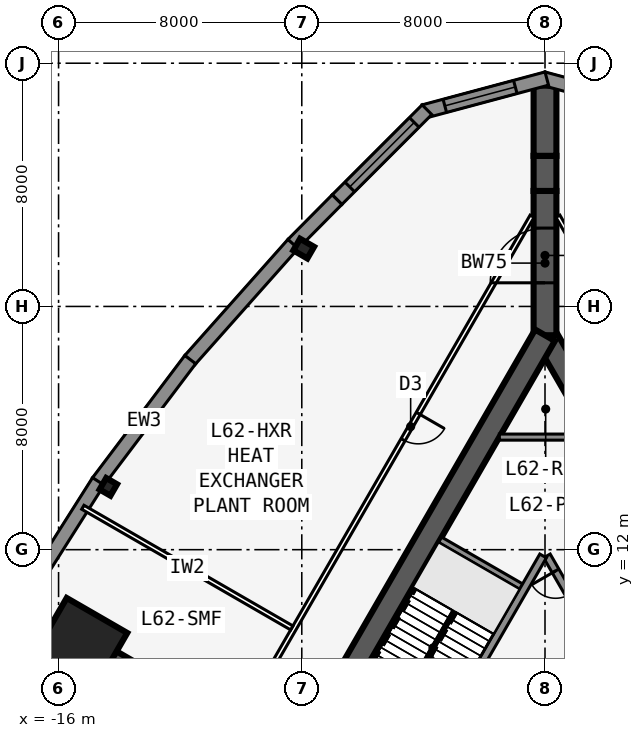
"""IFC4 building model, lengths in metres.
Left out: names, types, materials, properties, quantities, classifications, styles, units other than length and angle.
Written with IfcOpenShell. Run it as: python <this file> out.ifc"""

import sys

from ifc_helpers import new_model, si_unit, direction, frame, frame_2d, origin, origin_2d, place, context, subcontext, project, spatial, polyline, rectangle, i_section, outline, extrude, element, fill, save


model = new_model("IFC4")
c1 = context("Model", 3, precision=1e-05, world=origin(), true_north=direction((0.0, 1.0)))
c2 = subcontext(c1, "Body", "Model", "MODEL_VIEW")
j1 = project(units=[si_unit("LENGTHUNIT", "METRE"), si_unit("PLANEANGLEUNIT", "RADIAN")], contexts=[c1])
p1 = place(None, origin())
s1 = spatial("IfcSite", under=j1, at=p1, CompositionType="ELEMENT")
p2 = place(p1, origin())
s2 = spatial("IfcBuilding", under=s1, at=p2, CompositionType="ELEMENT")
p3 = place(p2, frame((0.0, 0.0, 233.3)))
s3 = spatial("IfcBuildingStorey", under=s2, at=p3, CompositionType="ELEMENT", Elevation=233.3)
p4 = place(p3, frame((8.25, 4.763, 0.0), z_axis=(0.0, 0.0, 1.0), x_axis=(-0.500002952946, 0.866023698893, 0.0)))
e1 = element("IfcWall", 1, at=p4, inside=s3, PredefinedType="SHEAR", context=c2, shape_type="SweptSolid", body=[
    extrude(rectangle(XDim=16.5, YDim=0.75, at=frame_2d((8.25, 0.0))), origin(), (0.0, 0.0, 1.0), 6.0),
])
p5 = place(p3, frame((5.379, 2.586, 0.0), z_axis=(0.0, 0.0, 1.0), x_axis=(-0.500001375892, 0.866024609411, 0.0)))
e2 = element("IfcWall", 2, at=p5, inside=s3, PredefinedType="SOLIDWALL", context=c2, shape_type="SweptSolid", body=[
    extrude(rectangle(XDim=10.633, YDim=0.25, at=frame_2d((5.316, 0.0))), origin(), (0.0, 0.0, 1.0), 5.75),
])
p6 = place(p5, frame((9.164, 0.0, 0.0)))
e3 = element("IfcOpeningElement", 3, at=p6, cuts=e2, PredefinedType="OPENING", context=c2, shape_type="SweptSolid", body=[
    extrude(rectangle(XDim=0.9, YDim=2.13, at=frame_2d((0.45, 1.065))), frame((0.0, 0.135, 0.0), z_axis=(0.0, -1.0, 0.0), x_axis=(1.0, 0.0, 0.0)), (0.0, 0.0, 1.0), 0.27),
])
p7 = place(p5, frame((1.0, 0.0, 0.0)))
e4 = element("IfcOpeningElement", 4, at=p7, cuts=e2, PredefinedType="OPENING", context=c2, shape_type="SweptSolid", body=[
    extrude(rectangle(XDim=1.1, YDim=2.13, at=frame_2d((0.55, 1.065))), frame((0.0, 0.135, 0.0), z_axis=(0.0, -1.0, 0.0), x_axis=(1.0, 0.0, 0.0)), (0.0, 0.0, 1.0), 0.27),
])
p8 = place(p5, frame((3.9, 0.0, 0.0)))
e5 = element("IfcOpeningElement", 5, at=p8, cuts=e2, PredefinedType="OPENING", context=c2, shape_type="SweptSolid", body=[
    extrude(rectangle(XDim=1.1, YDim=2.13, at=frame_2d((0.55, 1.065))), frame((0.0, 0.135, 0.0), z_axis=(0.0, -1.0, 0.0), x_axis=(1.0, 0.0, 0.0)), (0.0, 0.0, 1.0), 0.27),
])
p9 = place(p5, frame((6.8, 0.0, 0.0)))
e6 = element("IfcOpeningElement", 6, at=p9, cuts=e2, PredefinedType="OPENING", context=c2, shape_type="SweptSolid", body=[
    extrude(rectangle(XDim=1.1, YDim=2.13, at=frame_2d((0.55, 1.065))), frame((0.0, 0.135, 0.0), z_axis=(0.0, -1.0, 0.0), x_axis=(1.0, 0.0, 0.0)), (0.0, 0.0, 1.0), 0.27),
])
p10 = place(p3, frame((0.0, 19.052, 0.0), z_axis=(0.0, 0.0, 1.0), x_axis=(-0.500002952946, -0.866023698893, 0.0)))
e7 = element("IfcWall", 7, at=p10, inside=s3, PredefinedType="SHEAR", context=c2, shape_type="SweptSolid", body=[
    extrude(rectangle(XDim=16.5, YDim=0.75, at=frame_2d((8.25, 0.0))), origin(), (0.0, 0.0, 1.0), 6.0),
])
p11 = place(p10, frame((14.15, 0.0, 0.0)))
e8 = element("IfcOpeningElement", 8, at=p11, cuts=e7, PredefinedType="OPENING", context=c2, shape_type="SweptSolid", body=[
    extrude(rectangle(XDim=1.8, YDim=2.13, at=frame_2d((0.9, 1.065))), frame((0.0, 0.385, 0.0), z_axis=(0.0, -1.0, 0.0), x_axis=(1.0, 0.0, 0.0)), (0.0, 0.0, 1.0), 0.77),
])
p12 = place(p10, frame((12.6, 0.0, 0.0)))
e9 = element("IfcOpeningElement", 9, at=p12, cuts=e7, PredefinedType="OPENING", context=c2, shape_type="SweptSolid", body=[
    extrude(rectangle(XDim=1.0, YDim=2.13, at=frame_2d((0.5, 1.065))), frame((0.0, 0.385, 0.0), z_axis=(0.0, -1.0, 0.0), x_axis=(1.0, 0.0, 0.0)), (0.0, 0.0, 1.0), 0.77),
])
p13 = place(p3, frame((-0.062, 11.794, 0.0), z_axis=(0.0, 0.0, 1.0), x_axis=(-0.500006680225, -0.86602154692, 0.0)))
e10 = element("IfcWall", 10, at=p13, inside=s3, PredefinedType="SOLIDWALL", context=c2, shape_type="SweptSolid", body=[
    extrude(rectangle(XDim=7.733, YDim=0.25, at=frame_2d((3.866, 0.0))), origin(), (0.0, 0.0, 1.0), 5.75),
])
p14 = place(p3, frame((-0.679, 10.727, 0.0), z_axis=(0.0, 0.0, 1.0), x_axis=(-0.866008981251, 0.500028443584, 0.0)))
e11 = element("IfcWall", 11, at=p14, inside=s3, PredefinedType="SOLIDWALL", context=c2, shape_type="SweptSolid", body=[
    extrude(rectangle(XDim=3.2, YDim=0.2, at=frame_2d((1.6, 0.0))), origin(), (0.0, 0.0, 1.0), 5.75),
])
p15 = place(p3, frame((0.0, 19.052, 0.0), z_axis=(0.0, 0.0, 1.0), x_axis=(0.0, 1.0, 0.0)))
e12 = element("IfcWall", 12, at=p15, inside=s3, PredefinedType="SHEAR", context=c2, shape_type="SweptSolid", body=[
    extrude(rectangle(XDim=4.746, YDim=0.75, at=frame_2d((2.373, 0.0))), origin(), (0.0, 0.0, 1.0), 6.0),
])
p16 = place(p15, frame((1.725, 0.0, 0.0)))
e13 = element("IfcOpeningElement", 13, at=p16, cuts=e12, PredefinedType="OPENING", context=c2, shape_type="SweptSolid", body=[
    extrude(rectangle(XDim=1.8, YDim=2.13, at=frame_2d((0.9, 1.065))), frame((0.0, 0.385, 0.0), z_axis=(0.0, -1.0, 0.0), x_axis=(1.0, 0.0, 0.0)), (0.0, 0.0, 1.0), 0.77),
])
p17 = place(p3, frame((0.0, 23.799, 0.0), z_axis=(0.0, 0.0, 1.0), x_axis=(0.0, 1.0, 0.0)))
e14 = element("IfcWall", 14, at=p17, inside=s3, PredefinedType="SHEAR", context=c2, shape_type="SweptSolid", body=[
    extrude(rectangle(XDim=1.155, YDim=0.75, at=frame_2d((0.577, 0.0))), origin(), (0.0, 0.0, 1.0), 6.0),
])
p18 = place(p3, frame((0.0, 24.953, 0.0), z_axis=(0.0, 0.0, 1.0), x_axis=(0.0, 1.0, 0.0)))
e15 = element("IfcWall", 15, at=p18, inside=s3, PredefinedType="SHEAR", context=c2, shape_type="SweptSolid", body=[
    extrude(rectangle(XDim=2.309, YDim=0.75, at=frame_2d((1.155, 0.0))), origin(), (0.0, 0.0, 1.0), 6.0),
])
p19 = place(p3, frame((-8.25, 4.763, 0.0), z_axis=(0.0, 0.0, 1.0), x_axis=(-0.866023543838, 0.500003221507, 0.0)))
e16 = element("IfcWall", 16, at=p19, inside=s3, PredefinedType="SHEAR", context=c2, shape_type="SweptSolid", body=[
    extrude(rectangle(XDim=8.154, YDim=0.9, at=frame_2d((4.077, 0.0))), origin(), (0.0, 0.0, 1.0), 6.0),
])
p20 = place(p3, frame((-7.937, 21.903, 0.0), z_axis=(0.0, 0.0, 1.0), x_axis=(-0.5, -0.866025403784, 0.0)))
e17 = element("IfcColumn", 17, at=p20, inside=s3, PredefinedType="COLUMN", context=c2, shape_type="SweptSolid", body=[
    extrude(i_section(OverallWidth=0.442, OverallDepth=0.531, WebThickness=0.066, FlangeThickness=0.106, at=origin_2d()), origin(), (0.0, 0.0, 1.0), 6.0),
])
p21 = place(p3, frame((-14.363, 14.066, 0.0), z_axis=(0.0, 0.0, 1.0), x_axis=(-0.866025403784, 0.5, 0.0)))
e18 = element("IfcColumn", 18, at=p21, inside=s3, PredefinedType="COLUMN", context=c2, shape_type="SweptSolid", body=[
    extrude(i_section(OverallWidth=0.411, OverallDepth=0.434, WebThickness=0.036, FlangeThickness=0.057, at=origin_2d()), origin(), (0.0, 0.0, 1.0), 6.0),
])
p22 = place(p3, frame((-15.312, 8.84, 0.0), z_axis=(0.0, 0.0, 1.0), x_axis=(-0.866025403784, 0.5, 0.0)))
e19 = element("IfcColumn", 19, at=p22, inside=s3, PredefinedType="COLUMN", context=c2, shape_type="SweptSolid", body=[
    extrude(rectangle(XDim=2.3, YDim=2.3, at=origin_2d()), origin(), (0.0, 0.0, 1.0), 6.0),
])
p23 = place(p3, frame((3.983, 26.413, 0.0), z_axis=(0.0, 0.0, 1.0), x_axis=(-0.965920442324, 0.258839137498, 0.0)))
e20 = element("IfcWall", 20, at=p23, inside=s3, PredefinedType="SOLIDWALL", context=c2, shape_type="SweptSolid", body=[
    extrude(outline(polyline([(4.184, 0.225), (4.124, 0.225), (3.706, 0.113), (3.676, 0.225), (0.0, 0.225), (0.0, -0.225), (4.184, -0.225), (4.184, 0.225)])), origin(), (0.0, 0.0, 1.0), 5.75),
])
p24 = place(p23, frame((0.713, 0.0, 0.9)))
e21 = element("IfcOpeningElement", 21, at=p24, cuts=e20, PredefinedType="OPENING", context=c2, shape_type="SweptSolid", body=[
    extrude(rectangle(XDim=2.4, YDim=3.6, at=frame_2d((1.2, 1.8))), frame((0.0, 0.235, 0.0), z_axis=(0.0, -1.0, 0.0), x_axis=(1.0, 0.0, 0.0)), (0.0, 0.0, 1.0), 0.47),
])
p25 = place(p3, frame((0.058, 27.496, 0.0), z_axis=(0.0, 0.0, 1.0), x_axis=(-0.965920442324, -0.258839137498, 0.0)))
e22 = element("IfcWall", 22, at=p25, inside=s3, PredefinedType="SOLIDWALL", context=c2, shape_type="SweptSolid", body=[
    extrude(outline(polyline([(4.184, 0.225), (0.509, 0.225), (0.479, 0.113), (0.06, 0.225), (0.0, 0.225), (0.0, -0.225), (4.184, -0.225), (4.184, 0.225)])), origin(), (0.0, 0.0, 1.0), 5.75),
])
p26 = place(p25, frame((1.071, 0.0, 0.9)))
e23 = element("IfcOpeningElement", 23, at=p26, cuts=e22, PredefinedType="OPENING", context=c2, shape_type="SweptSolid", body=[
    extrude(rectangle(XDim=2.4, YDim=3.6, at=frame_2d((1.2, 1.8))), frame((0.0, 0.235, 0.0), z_axis=(0.0, -1.0, 0.0), x_axis=(1.0, 0.0, 0.0)), (0.0, 0.0, 1.0), 0.47),
])
p27 = place(p3, frame((-3.882, 26.471, 0.0), z_axis=(0.0, 0.0, 1.0), x_axis=(-0.707106781187, -0.707106781187, 0.0)))
e24 = element("IfcWall", 24, at=p27, inside=s3, PredefinedType="SOLIDWALL", context=c2, shape_type="SweptSolid", body=[
    extrude(rectangle(XDim=4.184, YDim=0.45, at=frame_2d((2.092, 0.0))), origin(), (0.0, 0.0, 1.0), 5.75),
])
p28 = place(p27, frame((0.592, 0.0, 0.9)))
e25 = element("IfcOpeningElement", 25, at=p28, cuts=e24, PredefinedType="OPENING", context=c2, shape_type="SweptSolid", body=[
    extrude(rectangle(XDim=3.0, YDim=3.6, at=frame_2d((1.5, 1.8))), frame((0.0, 0.235, 0.0), z_axis=(0.0, -1.0, 0.0), x_axis=(1.0, 0.0, 0.0)), (0.0, 0.0, 1.0), 0.47),
])
p29 = place(p3, frame((-6.84, 23.513, 0.0), z_axis=(0.0, 0.0, 1.0), x_axis=(-0.704208960141, -0.709992774933, 0.0)))
e26 = element("IfcWall", 26, at=p29, inside=s3, PredefinedType="SOLIDWALL", context=c2, shape_type="SweptSolid", body=[
    extrude(rectangle(XDim=2.068, YDim=0.45, at=frame_2d((1.034, 0.0))), origin(), (0.0, 0.0, 1.0), 5.75),
])
p30 = place(p3, frame((-8.288, 22.053, 0.0), z_axis=(0.0, 0.0, 1.0), x_axis=(-0.664375712375, -0.747398764253, 0.0)))
e27 = element("IfcWall", 27, at=p30, inside=s3, PredefinedType="SOLIDWALL", context=c2, shape_type="SweptSolid", body=[
    extrude(outline(polyline([(0.0, 0.0), (5.105, 0.0), (5.105, 5.75), (0.0, 5.75), (0.0, 0.0)]), holes=[polyline([(4.502, 2.875), (4.436, 3.38), (4.241, 3.85), (3.931, 4.254), (3.527, 4.564), (3.057, 4.759), (2.552, 4.825), (2.048, 4.759), (1.577, 4.564), (1.174, 4.254), (0.864, 3.85), (0.669, 3.38), (0.602, 2.875), (0.669, 2.37), (0.864, 1.9), (1.174, 1.496), (1.577, 1.186), (2.048, 0.991), (2.552, 0.925), (3.057, 0.991), (3.527, 1.186), (3.931, 1.496), (4.241, 1.9), (4.436, 2.37), (4.502, 2.875)])]), frame((0.0, 0.225, 0.0), z_axis=(0.0, -1.0, 0.0), x_axis=(1.0, 0.0, 0.0)), (0.0, 0.0, 1.0), 0.45),
])
p31 = place(p3, frame((-11.668, 18.252, 0.0), z_axis=(0.0, 0.0, 1.0), x_axis=(-0.602408653511, -0.798187831388, 0.0)))
e28 = element("IfcWall", 28, at=p31, inside=s3, PredefinedType="SOLIDWALL", context=c2, shape_type="SweptSolid", body=[
    extrude(outline(polyline([(0.0, 0.0), (5.038, 0.0), (5.038, 5.75), (0.0, 5.75), (0.0, 0.0)]), holes=[polyline([(4.419, 2.875), (4.354, 3.367), (4.164, 3.825), (3.863, 4.219), (3.469, 4.52), (3.011, 4.71), (2.519, 4.775), (2.027, 4.71), (1.569, 4.52), (1.176, 4.219), (0.874, 3.825), (0.684, 3.367), (0.619, 2.875), (0.684, 2.383), (0.874, 1.925), (1.176, 1.531), (1.569, 1.229), (2.027, 1.04), (2.519, 0.975), (3.011, 1.04), (3.469, 1.229), (3.863, 1.531), (4.164, 1.925), (4.354, 2.383), (4.419, 2.875)])]), frame((0.0, 0.225, 0.0), z_axis=(0.0, -1.0, 0.0), x_axis=(1.0, 0.0, 0.0)), (0.0, 0.0, 1.0), 0.45),
])
p32 = place(p3, frame((-14.693, 14.246, 0.0), z_axis=(0.0, 0.0, 1.0), x_axis=(-0.535242418236, -0.844698498709, 0.0)))
e29 = element("IfcWall", 29, at=p32, inside=s3, PredefinedType="SOLIDWALL", context=c2, shape_type="SweptSolid", body=[
    extrude(outline(polyline([(0.0, 0.0), (5.004, 0.0), (5.004, 5.75), (0.0, 5.75), (0.0, 0.0)]), holes=[polyline([(4.402, 2.875), (4.337, 3.367), (4.148, 3.825), (3.846, 4.219), (3.452, 4.52), (2.994, 4.71), (2.502, 4.775), (2.01, 4.71), (1.552, 4.52), (1.159, 4.219), (0.857, 3.825), (0.667, 3.367), (0.602, 2.875), (0.667, 2.383), (0.857, 1.925), (1.159, 1.531), (1.552, 1.229), (2.01, 1.04), (2.502, 0.975), (2.994, 1.04), (3.452, 1.229), (3.846, 1.531), (4.148, 1.925), (4.337, 2.383), (4.402, 2.875)])]), frame((0.0, 0.225, 0.0), z_axis=(0.0, -1.0, 0.0), x_axis=(1.0, 0.0, 0.0)), (0.0, 0.0, 1.0), 0.45),
])
p33 = place(p3, frame((20.102, -11.115, 0.0), z_axis=(0.0, 0.0, 1.0), x_axis=(-0.500000265775, 0.866025250339, 0.0)))
e30 = element("IfcWall", 30, at=p33, inside=s3, PredefinedType="PARTITIONING", context=c2, shape_type="SweptSolid", body=[
    extrude(rectangle(XDim=39.354, YDim=0.15, at=frame_2d((19.677, 0.0))), origin(), (0.0, 0.0, 1.0), 5.75),
])
p34 = place(p33, frame((9.489, 0.0, 0.0)))
e31 = element("IfcOpeningElement", 31, at=p34, cuts=e30, PredefinedType="OPENING", context=c2, shape_type="SweptSolid", body=[
    extrude(rectangle(XDim=1.0, YDim=2.13, at=frame_2d((0.5, 1.065))), frame((0.0, 0.085, 0.0), z_axis=(0.0, -1.0, 0.0), x_axis=(1.0, 0.0, 0.0)), (0.0, 0.0, 1.0), 0.17),
])
p35 = place(p33, frame((21.177, 0.0, 0.0)))
e32 = element("IfcOpeningElement", 32, at=p35, cuts=e30, PredefinedType="OPENING", context=c2, shape_type="SweptSolid", body=[
    extrude(rectangle(XDim=1.0, YDim=2.13, at=frame_2d((0.5, 1.065))), frame((0.0, 0.085, 0.0), z_axis=(0.0, -1.0, 0.0), x_axis=(1.0, 0.0, 0.0)), (0.0, 0.0, 1.0), 0.17),
])
p36 = place(p33, frame((30.865, 0.0, 0.0)))
e33 = element("IfcOpeningElement", 33, at=p36, cuts=e30, PredefinedType="OPENING", context=c2, shape_type="SweptSolid", body=[
    extrude(rectangle(XDim=1.0, YDim=2.13, at=frame_2d((0.5, 1.065))), frame((0.0, 0.085, 0.0), z_axis=(0.0, -1.0, 0.0), x_axis=(1.0, 0.0, 0.0)), (0.0, 0.0, 1.0), 0.17),
])
p37 = place(p3, frame((-0.425, 22.966, 0.0), z_axis=(0.0, 0.0, 1.0), x_axis=(-0.500000265775, -0.866025250339, 0.0)))
e34 = element("IfcWall", 34, at=p37, inside=s3, PredefinedType="PARTITIONING", context=c2, shape_type="SweptSolid", body=[
    extrude(rectangle(XDim=39.354, YDim=0.15, at=frame_2d((19.677, 0.0))), origin(), (0.0, 0.0, 1.0), 5.75),
])
p38 = place(p37, frame((7.489, 0.0, 0.0)))
e35 = element("IfcOpeningElement", 35, at=p38, cuts=e34, PredefinedType="OPENING", context=c2, shape_type="SweptSolid", body=[
    extrude(rectangle(XDim=1.0, YDim=2.13, at=frame_2d((0.5, 1.065))), frame((0.0, 0.085, 0.0), z_axis=(0.0, -1.0, 0.0), x_axis=(1.0, 0.0, 0.0)), (0.0, 0.0, 1.0), 0.17),
])
p39 = place(p37, frame((17.177, 0.0, 0.0)))
e36 = element("IfcOpeningElement", 36, at=p39, cuts=e34, PredefinedType="OPENING", context=c2, shape_type="SweptSolid", body=[
    extrude(rectangle(XDim=1.0, YDim=2.13, at=frame_2d((0.5, 1.065))), frame((0.0, 0.085, 0.0), z_axis=(0.0, -1.0, 0.0), x_axis=(1.0, 0.0, 0.0)), (0.0, 0.0, 1.0), 0.17),
])
p40 = place(p37, frame((28.865, 0.0, 0.0)))
e37 = element("IfcOpeningElement", 37, at=p40, cuts=e34, PredefinedType="OPENING", context=c2, shape_type="SweptSolid", body=[
    extrude(rectangle(XDim=1.0, YDim=2.13, at=frame_2d((0.5, 1.065))), frame((0.0, 0.085, 0.0), z_axis=(0.0, -1.0, 0.0), x_axis=(1.0, 0.0, 0.0)), (0.0, 0.0, 1.0), 0.17),
])
p41 = place(p3, frame((-8.329, 9.427, 0.0), z_axis=(0.0, 0.0, 1.0), x_axis=(-0.866027296944, 0.499996720937, 0.0)))
e38 = element("IfcWall", 38, at=p41, inside=s3, PredefinedType="PARTITIONING", context=c2, shape_type="SweptSolid", body=[
    extrude(rectangle(XDim=7.937, YDim=0.15, at=frame_2d((3.968, 0.0))), origin(), (0.0, 0.0, 1.0), 5.75),
])
p42 = place(p3, frame((-1.501, 15.703, 0.0), z_axis=(0.0, 0.0, 1.0), x_axis=(1.0, 0.0, 0.0)))
e39 = element("IfcWall", 39, at=p42, inside=s3, PredefinedType="SOLIDWALL", context=c2, shape_type="SweptSolid", body=[
    extrude(rectangle(XDim=3.002, YDim=0.2, at=frame_2d((1.501, 0.0))), origin(), (0.0, 0.0, 1.0), 5.75),
])
p43 = place(p3, frame((-2.988, 9.978, 0.0), z_axis=(0.0, 0.0, 1.0), x_axis=(-0.499992232847, -0.866029888106, 0.0)))
e40 = element("IfcWall", 40, at=p43, inside=s3, PredefinedType="SOLIDWALL", context=c2, shape_type="SweptSolid", body=[
    extrude(rectangle(XDim=2.794, YDim=0.1, at=frame_2d((1.397, 0.0))), origin(), (0.0, 0.0, 1.0), 6.0),
])
p44 = place(p26, origin())
e41 = element("IfcWindow", 41, at=p44, inside=s3, PartitioningType="SINGLE_PANEL", PredefinedType="WINDOW", context=c2, shape_type="SweptSolid", body=[
    extrude(rectangle(XDim=2.4, YDim=3.6, at=frame_2d((1.2, 1.8))), frame((0.0, 0.03, 0.0), z_axis=(0.0, -1.0, 0.0), x_axis=(1.0, 0.0, 0.0)), (0.0, 0.0, 1.0), 0.06),
])
fill(e23, e41)
p45 = place(p28, origin())
e42 = element("IfcWindow", 42, at=p45, inside=s3, PartitioningType="SINGLE_PANEL", PredefinedType="WINDOW", context=c2, shape_type="SweptSolid", body=[
    extrude(rectangle(XDim=3.0, YDim=3.6, at=frame_2d((1.5, 1.8))), frame((0.0, 0.03, 0.0), z_axis=(0.0, -1.0, 0.0), x_axis=(1.0, 0.0, 0.0)), (0.0, 0.0, 1.0), 0.06),
])
fill(e25, e42)
p46 = place(p38, origin())
e43 = element("IfcDoor", 43, at=p46, inside=s3, OperationType="SINGLE_SWING_LEFT", PredefinedType="DOOR", context=c2, shape_type="SweptSolid", body=[
    extrude(rectangle(XDim=1.0, YDim=2.13, at=frame_2d((0.5, 1.065))), frame((0.0, 0.025, 0.0), z_axis=(0.0, -1.0, 0.0), x_axis=(1.0, 0.0, 0.0)), (0.0, 0.0, 1.0), 0.05),
])
fill(e35, e43)
p47 = place(p16, origin())
e44 = element("IfcDoor", 44, at=p47, inside=s3, OperationType="DOUBLE_DOOR_DOUBLE_SWING", PredefinedType="DOOR", context=c2, shape_type="SweptSolid", body=[
    extrude(rectangle(XDim=1.8, YDim=2.13, at=frame_2d((0.9, 1.065))), frame((0.0, 0.025, 0.0), z_axis=(0.0, -1.0, 0.0), x_axis=(1.0, 0.0, 0.0)), (0.0, 0.0, 1.0), 0.05),
])
fill(e13, e44)
p48 = place(p6, origin())
e45 = element("IfcDoor", 45, at=p48, inside=s3, OperationType="SINGLE_SWING_RIGHT", PredefinedType="DOOR", context=c2, shape_type="SweptSolid", body=[
    extrude(rectangle(XDim=0.9, YDim=2.13, at=frame_2d((0.45, 1.065))), frame((0.0, 0.025, 0.0), z_axis=(0.0, -1.0, 0.0), x_axis=(1.0, 0.0, 0.0)), (0.0, 0.0, 1.0), 0.05),
])
fill(e3, e45)
save(model, sys.argv[1])
